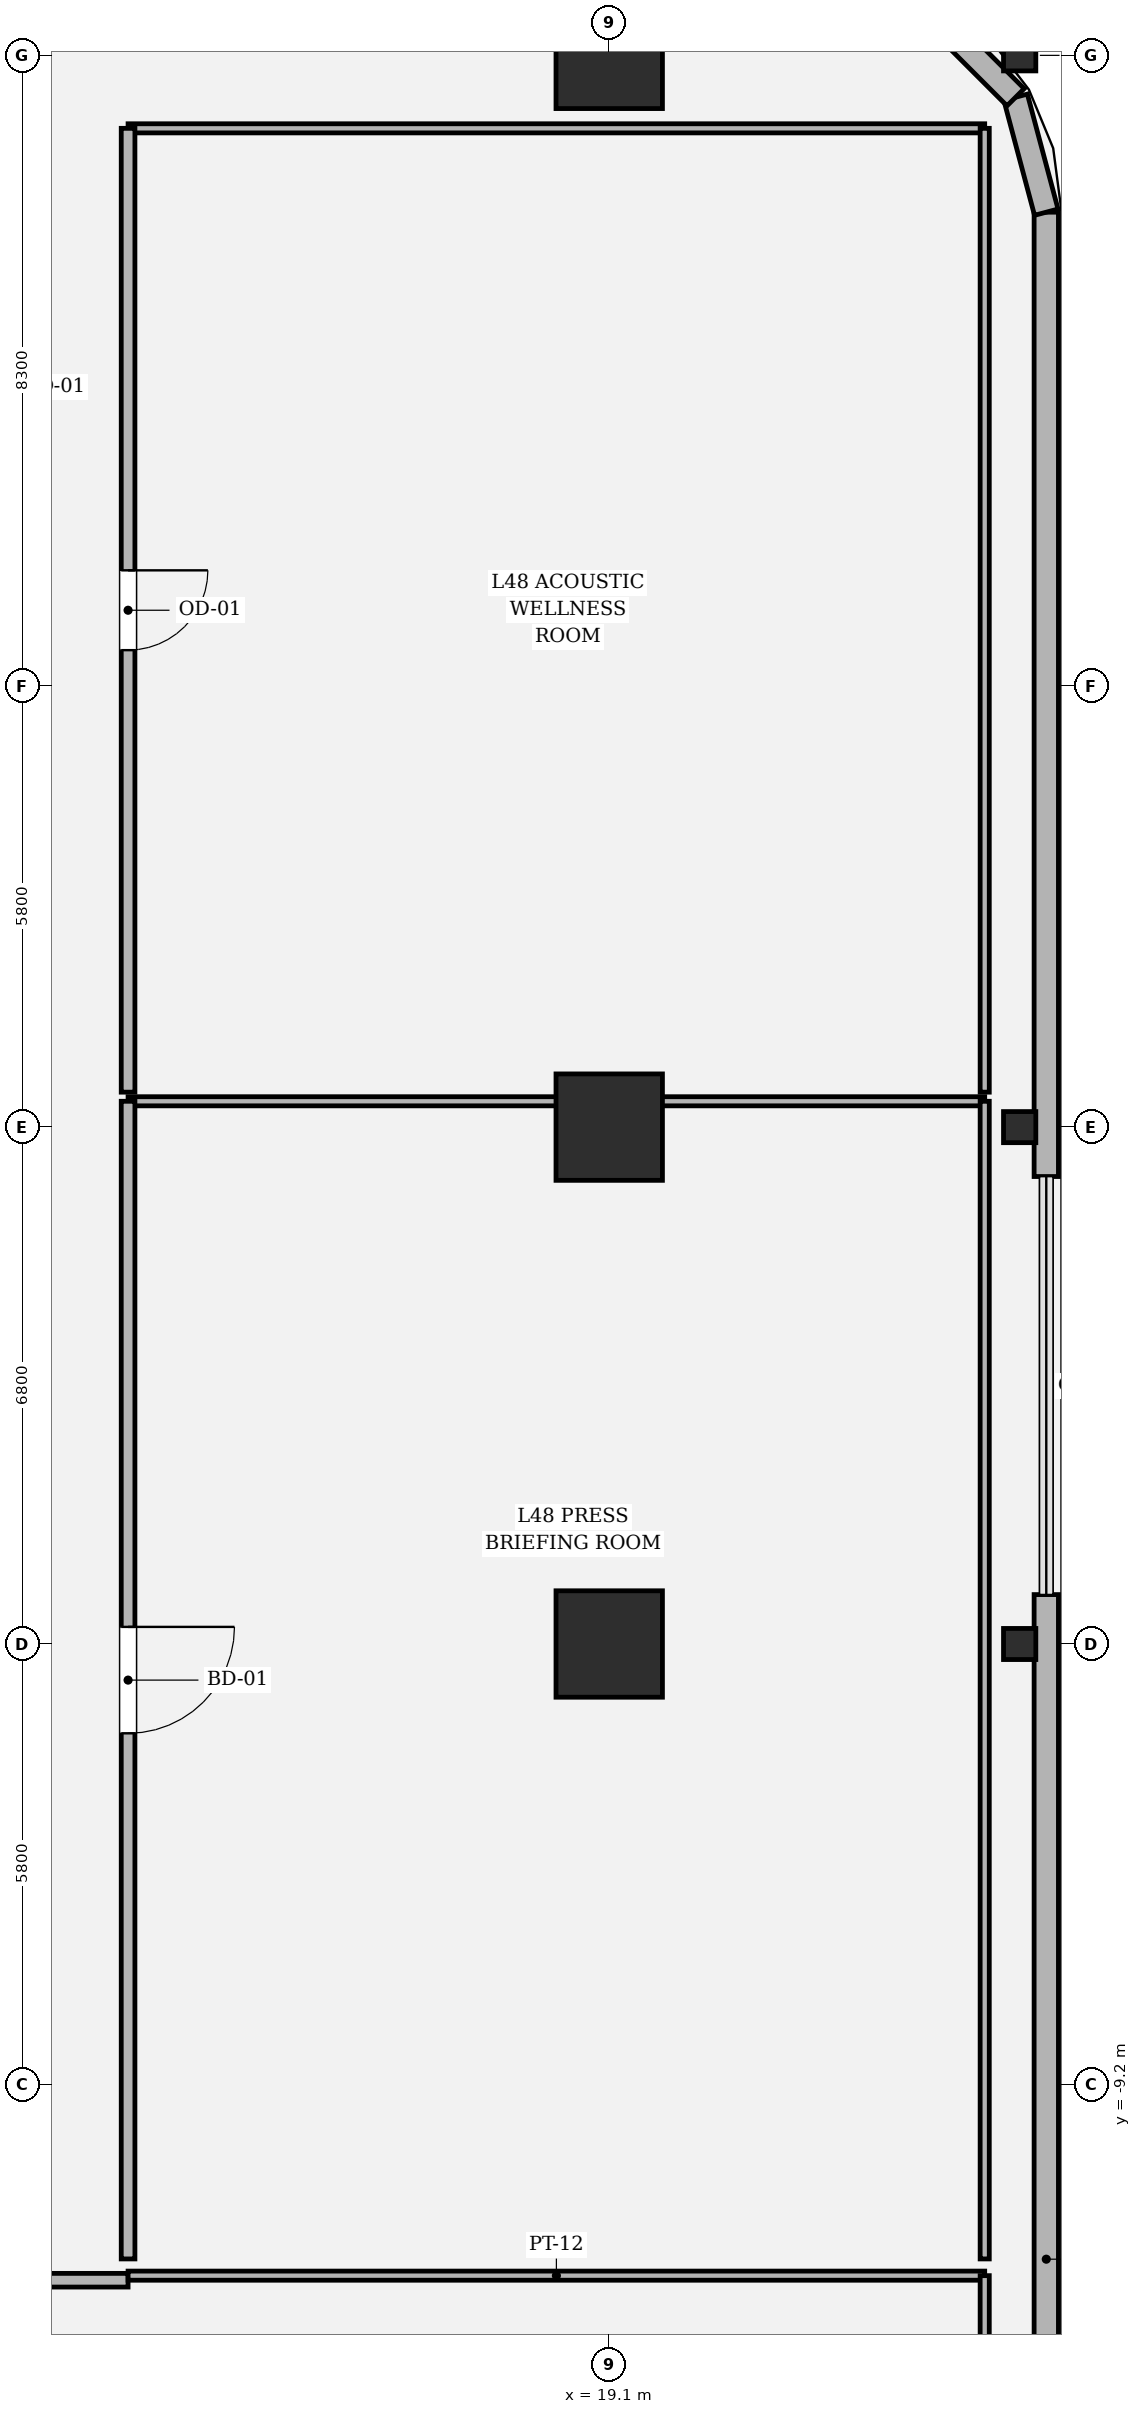
"""IFC4 building model, lengths in metres.
Left out: names, types, materials, properties, quantities, classifications, styles, units other than length and angle.
Written with IfcOpenShell. Run it as: python <this file> out.ifc"""

import sys

from ifc_helpers import new_model, si_unit, direction, frame, frame_2d, origin, origin_2d, place, context, subcontext, project, spatial, rectangle, hollow_rectangle, i_section, extrude, element, fill, save


model = new_model("IFC4")
c1 = context("Model", 3, precision=1e-05, world=origin(), true_north=direction((0.0, 1.0)))
c2 = subcontext(c1, "Body", "Model", "MODEL_VIEW")
j1 = project(units=[si_unit("LENGTHUNIT", "METRE"), si_unit("PLANEANGLEUNIT", "RADIAN")], contexts=[c1])
p1 = place(None, origin())
s1 = spatial("IfcSite", under=j1, at=p1, CompositionType="ELEMENT")
p2 = place(p1, origin())
s2 = spatial("IfcBuilding", under=s1, at=p2, CompositionType="ELEMENT")
p3 = place(p2, frame((0.0, 0.0, 204.6)))
s3 = spatial("IfcBuildingStorey", under=s2, at=p3, CompositionType="ELEMENT", Elevation=204.6)
for number, where, z_axis, x_axis in (
    (1, (19.1, -3.4, 0.0), (0.0, 0.0, 1.0), (1.0, 0.0, 0.0)),
    (2, (19.1, 3.4, 0.0), (0.0, 0.0, 1.0), (1.0, 0.0, 0.0)),
    (3, (19.1, 17.5, 0.0), (0.0, 0.0, 1.0), (1.0, 0.0, 0.0)),
):
    element("IfcColumn", number, at=place(p3, frame(where, z_axis=z_axis, x_axis=x_axis)), inside=s3, PredefinedType="COLUMN", context=c2, shape_type="SweptSolid", body=[
        extrude(hollow_rectangle(XDim=1.4, YDim=1.4, WallThickness=0.042, at=origin_2d()), origin(), (0.0, 0.0, 1.0), 4.05),
    ])
for number, where, z_axis, x_axis in (
    (4, (24.5, -3.4, 0.0), (0.0, 0.0, 1.0), (0.0, 1.0, 0.0)),
    (5, (24.5, 3.4, 0.0), (0.0, 0.0, 1.0), (0.0, 1.0, 0.0)),
    (6, (24.5, 17.5, 0.0), (0.0, 0.0, 1.0), (0.0, 1.0, 0.0)),
):
    element("IfcColumn", number, at=place(p3, frame(where, z_axis=z_axis, x_axis=x_axis)), inside=s3, PredefinedType="COLUMN", context=c2, shape_type="SweptSolid", body=[
        extrude(i_section(OverallWidth=0.409, OverallDepth=0.425, WebThickness=0.032, FlangeThickness=0.052, FilletRadius=0.018, at=origin_2d()), origin(), (0.0, 0.0, 1.0), 4.048),
    ])
p4 = place(p3, frame((24.85, -20.237, 0.0), z_axis=(0.0, 0.0, 1.0), x_axis=(0.0, 1.0, 0.0)))
e7 = element("IfcWall", 7, at=p4, inside=s3, PredefinedType="SOLIDWALL", context=c2, shape_type="SweptSolid", body=[
    extrude(rectangle(XDim=17.487, YDim=0.32, at=frame_2d((8.743, 0.0))), origin(), (0.0, 0.0, 1.0), 2.544),
])
p5 = place(p3, frame((24.85, 2.75, 0.0), z_axis=(0.0, 0.0, 1.0), x_axis=(0.0, 1.0, 0.0)))
e8 = element("IfcWall", 8, at=p5, inside=s3, PredefinedType="SOLIDWALL", context=c2, shape_type="SweptSolid", body=[
    extrude(rectangle(XDim=12.687, YDim=0.32, at=frame_2d((6.344, 0.0))), origin(), (0.0, 0.0, 1.0), 2.544),
])
p6 = place(p3, frame((24.85, 15.437, 0.0), z_axis=(0.0, 0.0, 1.0), x_axis=(-0.257847112249, 0.966185730957, 0.0)))
e9 = element("IfcWall", 9, at=p6, inside=s3, PredefinedType="SOLIDWALL", context=c2, shape_type="SweptSolid", body=[
    extrude(rectangle(XDim=1.565, YDim=0.32, at=frame_2d((0.783, 0.0))), origin(), (0.0, 0.0, 1.0), 2.544),
])
p7 = place(p3, frame((24.447, 16.949, 0.0), z_axis=(0.0, 0.0, 1.0), x_axis=(-0.707106781187, 0.707106781187, 0.0)))
e10 = element("IfcWall", 10, at=p7, inside=s3, PredefinedType="SOLIDWALL", context=c2, shape_type="SweptSolid", body=[
    extrude(rectangle(XDim=1.552, YDim=0.32, at=frame_2d((0.776, 0.0))), origin(), (0.0, 0.0, 1.0), 2.504),
])
p8 = place(p3, frame((-4.485, -11.77, 0.0), z_axis=(0.0, 0.0, 1.0), x_axis=(1.0, 0.0, 0.0)))
e11 = element("IfcWall", 11, at=p8, inside=s3, PredefinedType="PARTITIONING", context=c2, shape_type="SweptSolid", body=[
    extrude(rectangle(XDim=17.255, YDim=0.18, at=frame_2d((8.627, 0.0))), origin(), (0.0, 0.0, 1.0), 3.174),
])
p9 = place(p8, frame((7.927, 0.0, 0.0)))
e12 = element("IfcOpeningElement", 12, at=p9, cuts=e11, PredefinedType="OPENING", context=c2, shape_type="SweptSolid", body=[
    extrude(rectangle(XDim=1.4, YDim=2.25, at=frame_2d((0.7, 1.125))), frame((0.0, 0.1, 0.0), z_axis=(0.0, -1.0, 0.0), x_axis=(1.0, 0.0, 0.0)), (0.0, 0.0, 1.0), 0.2),
])
p10 = place(p3, frame((12.77, -11.71, 0.0), z_axis=(0.0, 0.0, 1.0), x_axis=(1.0, 0.0, 0.0)))
e13 = element("IfcWall", 13, at=p10, inside=s3, PredefinedType="PARTITIONING", context=c2, shape_type="SweptSolid", body=[
    extrude(rectangle(XDim=11.27, YDim=0.12, at=frame_2d((5.635, 0.0))), origin(), (0.0, 0.0, 1.0), 3.174),
])
p11 = place(p3, frame((24.04, -11.71, 0.0), z_axis=(0.0, 0.0, 1.0), x_axis=(0.0, -1.0, 0.0)))
e14 = element("IfcWall", 14, at=p11, inside=s3, PredefinedType="PARTITIONING", context=c2, shape_type="SweptSolid", body=[
    extrude(rectangle(XDim=10.438, YDim=0.12, at=frame_2d((5.219, 0.0))), origin(), (0.0, 0.0, 1.0), 2.504),
])
p12 = place(p3, frame((12.77, 3.74, 0.0), z_axis=(0.0, 0.0, 1.0), x_axis=(1.0, 0.0, 0.0)))
e15 = element("IfcWall", 15, at=p12, inside=s3, PredefinedType="PARTITIONING", context=c2, shape_type="SweptSolid", body=[
    extrude(rectangle(XDim=11.27, YDim=0.12, at=frame_2d((5.635, 0.0))), origin(), (0.0, 0.0, 1.0), 2.504),
])
p13 = place(p3, frame((24.04, 3.74, 0.0), z_axis=(0.0, 0.0, 1.0), x_axis=(0.0, -1.0, 0.0)))
e16 = element("IfcWall", 16, at=p13, inside=s3, PredefinedType="PARTITIONING", context=c2, shape_type="SweptSolid", body=[
    extrude(rectangle(XDim=15.23, YDim=0.12, at=frame_2d((7.615, 0.0))), origin(), (0.0, 0.0, 1.0), 2.504),
])
p14 = place(p3, frame((12.77, -11.49, 0.0), z_axis=(0.0, 0.0, 1.0), x_axis=(0.0, 1.0, 0.0)))
e17 = element("IfcWall", 17, at=p14, inside=s3, PredefinedType="PARTITIONING", context=c2, shape_type="SweptSolid", body=[
    extrude(rectangle(XDim=15.23, YDim=0.18, at=frame_2d((7.615, 0.0))), origin(), (0.0, 0.0, 1.0), 3.174),
])
p15 = place(p14, frame((6.915, 0.0, 0.0)))
e18 = element("IfcOpeningElement", 18, at=p15, cuts=e17, PredefinedType="OPENING", context=c2, shape_type="SweptSolid", body=[
    extrude(rectangle(XDim=1.4, YDim=2.25, at=frame_2d((0.7, 1.125))), frame((0.0, 0.1, 0.0), z_axis=(0.0, -1.0, 0.0), x_axis=(1.0, 0.0, 0.0)), (0.0, 0.0, 1.0), 0.2),
])
p16 = place(p3, frame((12.77, 16.54, 0.0), z_axis=(0.0, 0.0, 1.0), x_axis=(1.0, 0.0, 0.0)))
e19 = element("IfcWall", 19, at=p16, inside=s3, PredefinedType="PARTITIONING", context=c2, shape_type="SweptSolid", body=[
    extrude(rectangle(XDim=11.27, YDim=0.12, at=frame_2d((5.635, 0.0))), origin(), (0.0, 0.0, 1.0), 3.174),
])
p17 = place(p3, frame((24.04, 16.54, 0.0), z_axis=(0.0, 0.0, 1.0), x_axis=(0.0, -1.0, 0.0)))
e20 = element("IfcWall", 20, at=p17, inside=s3, PredefinedType="PARTITIONING", context=c2, shape_type="SweptSolid", body=[
    extrude(rectangle(XDim=12.68, YDim=0.12, at=frame_2d((6.34, 0.0))), origin(), (0.0, 0.0, 1.0), 3.83),
])
p18 = place(p3, frame((12.77, 3.86, 0.0), z_axis=(0.0, 0.0, 1.0), x_axis=(0.0, 1.0, 0.0)))
e21 = element("IfcWall", 21, at=p18, inside=s3, PredefinedType="PARTITIONING", context=c2, shape_type="SweptSolid", body=[
    extrude(rectangle(XDim=12.68, YDim=0.18, at=frame_2d((6.34, 0.0))), origin(), (0.0, 0.0, 1.0), 3.174),
])
p19 = place(p18, frame((5.815, 0.0, 0.0)))
e22 = element("IfcOpeningElement", 22, at=p19, cuts=e21, PredefinedType="OPENING", context=c2, shape_type="SweptSolid", body=[
    extrude(rectangle(XDim=1.05, YDim=2.2, at=frame_2d((0.525, 1.1))), frame((0.0, 0.1, 0.0), z_axis=(0.0, -1.0, 0.0), x_axis=(1.0, 0.0, 0.0)), (0.0, 0.0, 1.0), 0.2),
])
p20 = place(p15, origin())
e23 = element("IfcDoor", 23, at=p20, inside=s3, OperationType="SINGLE_SWING_RIGHT", PredefinedType="DOOR", context=c2, shape_type="SweptSolid", body=[
    extrude(rectangle(XDim=1.4, YDim=2.25, at=frame_2d((0.7, 1.125))), frame((0.0, 0.025, 0.0), z_axis=(0.0, -1.0, 0.0), x_axis=(1.0, 0.0, 0.0)), (0.0, 0.0, 1.0), 0.05),
])
fill(e18, e23)
p21 = place(p19, origin())
e24 = element("IfcDoor", 24, at=p21, inside=s3, OperationType="SINGLE_SWING_RIGHT", PredefinedType="DOOR", context=c2, shape_type="SweptSolid", body=[
    extrude(rectangle(XDim=1.05, YDim=2.2, at=frame_2d((0.525, 1.1))), frame((0.0, 0.025, 0.0), z_axis=(0.0, -1.0, 0.0), x_axis=(1.0, 0.0, 0.0)), (0.0, 0.0, 1.0), 0.05),
])
fill(e22, e24)
save(model, sys.argv[1])
